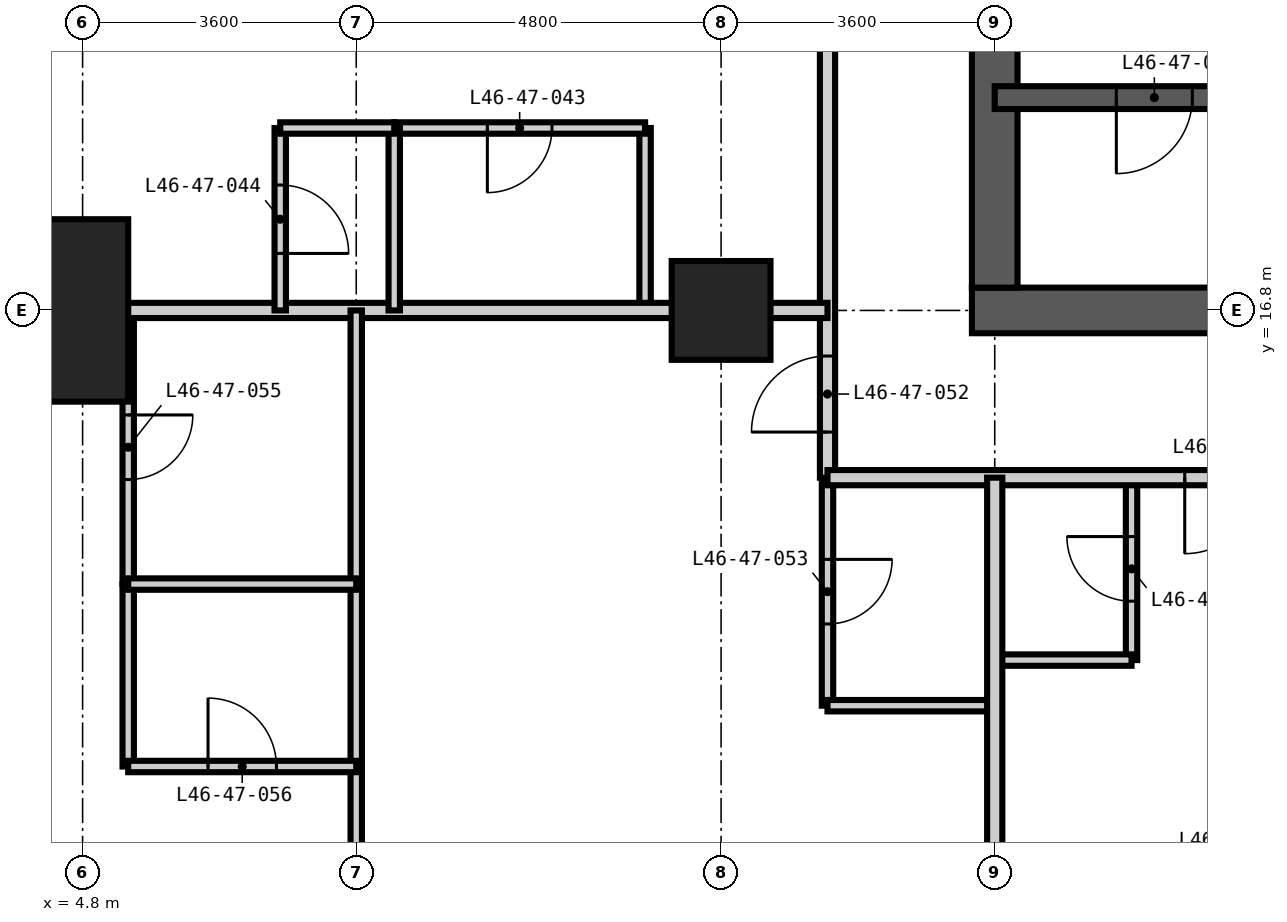
"""IFC4 building model, lengths in metres.
Left out: names, types, materials, properties, quantities, classifications, styles, units other than length and angle.
Written with IfcOpenShell. Run it as: python <this file> out.ifc"""

import sys

from ifc_helpers import new_model, si_unit, direction, frame, frame_2d, origin, origin_2d, place, context, subcontext, project, spatial, rectangle, extrude, element, fill, save


model = new_model("IFC4")
c1 = context("Model", 3, precision=1e-05, world=origin(), true_north=direction((0.0, 1.0)))
c2 = subcontext(c1, "Body", "Model", "MODEL_VIEW")
j1 = project(units=[si_unit("LENGTHUNIT", "METRE"), si_unit("PLANEANGLEUNIT", "RADIAN")], contexts=[c1])
p1 = place(None, origin())
s1 = spatial("IfcSite", under=j1, at=p1, CompositionType="ELEMENT")
p2 = place(p1, origin())
s2 = spatial("IfcBuilding", under=s1, at=p2, CompositionType="ELEMENT")
p3 = place(p2, frame((0.0, 0.0, 180.6)))
s3 = spatial("IfcBuildingStorey", under=s2, at=p3, CompositionType="ELEMENT", Elevation=180.6)
p4 = place(p3, frame((4.8, 16.8, -0.35), z_axis=(0.0, 0.0, 1.0), x_axis=(1.0, 0.0, 0.0)))
e1 = element("IfcColumn", 1, at=p4, inside=s3, PredefinedType="COLUMN", context=c2, shape_type="SweptSolid", body=[
    extrude(rectangle(XDim=1.2, YDim=2.4, at=origin_2d()), origin(), (0.0, 0.0, 1.0), 3.6),
])
p5 = place(p3, frame((13.2, 16.8, -0.35), z_axis=(0.0, 0.0, 1.0), x_axis=(1.0, 0.0, 0.0)))
e2 = element("IfcColumn", 2, at=p5, inside=s3, PredefinedType="COLUMN", context=c2, shape_type="SweptSolid", body=[
    extrude(rectangle(XDim=1.3, YDim=1.3, at=origin_2d()), origin(), (0.0, 0.0, 1.0), 3.6),
])
p6 = place(p3, frame((16.5, 16.8, -0.35), z_axis=(0.0, 0.0, 1.0), x_axis=(1.0, 0.0, 0.0)))
e3 = element("IfcWall", 3, at=p6, inside=s3, PredefinedType="SHEAR", context=c2, shape_type="SweptSolid", body=[
    extrude(rectangle(XDim=25.8, YDim=0.6, at=frame_2d((12.9, 0.0))), origin(), (0.0, 0.0, 1.0), 3.6),
])
p7 = place(p6, frame((12.4, 0.0, 0.35)))
e4 = element("IfcOpeningElement", 4, at=p7, cuts=e3, PredefinedType="OPENING", context=c2, shape_type="SweptSolid", body=[
    extrude(rectangle(XDim=1.0, YDim=2.1, at=frame_2d((0.5, 1.05))), frame((0.0, 0.31, 0.0), z_axis=(0.0, -1.0, 0.0), x_axis=(1.0, 0.0, 0.0)), (0.0, 0.0, 1.0), 0.62),
])
p8 = place(p6, frame((18.7, 0.0, 0.35)))
e5 = element("IfcOpeningElement", 5, at=p8, cuts=e3, PredefinedType="OPENING", context=c2, shape_type="SweptSolid", body=[
    extrude(rectangle(XDim=1.0, YDim=2.1, at=frame_2d((0.5, 1.05))), frame((0.0, 0.31, 0.0), z_axis=(0.0, -1.0, 0.0), x_axis=(1.0, 0.0, 0.0)), (0.0, 0.0, 1.0), 0.62),
])
p9 = place(p3, frame((16.8, 41.7, -0.35), z_axis=(0.0, 0.0, 1.0), x_axis=(0.0, -1.0, 0.0)))
e6 = element("IfcWall", 6, at=p9, inside=s3, PredefinedType="SHEAR", context=c2, shape_type="SweptSolid", body=[
    extrude(rectangle(XDim=24.6, YDim=0.6, at=frame_2d((12.3, 0.0))), origin(), (0.0, 0.0, 1.0), 3.6),
])
p10 = place(p9, frame((11.4, 0.0, 0.35)))
e7 = element("IfcOpeningElement", 7, at=p10, cuts=e6, PredefinedType="OPENING", context=c2, shape_type="SweptSolid", body=[
    extrude(rectangle(XDim=1.8, YDim=2.2, at=frame_2d((0.9, 1.1))), frame((0.0, 0.31, 0.0), z_axis=(0.0, -1.0, 0.0), x_axis=(1.0, 0.0, 0.0)), (0.0, 0.0, 1.0), 0.62),
])
p11 = place(p9, frame((20.2, 0.0, 0.35)))
e8 = element("IfcOpeningElement", 8, at=p11, cuts=e6, PredefinedType="OPENING", context=c2, shape_type="SweptSolid", body=[
    extrude(rectangle(XDim=1.0, YDim=2.1, at=frame_2d((0.5, 1.05))), frame((0.0, 0.31, 0.0), z_axis=(0.0, -1.0, 0.0), x_axis=(1.0, 0.0, 0.0)), (0.0, 0.0, 1.0), 0.62),
])
p12 = place(p9, frame((5.5, 0.0, 0.35)))
e9 = element("IfcOpeningElement", 9, at=p12, cuts=e6, PredefinedType="OPENING", context=c2, shape_type="SweptSolid", body=[
    extrude(rectangle(XDim=1.0, YDim=2.1, at=frame_2d((0.5, 1.05))), frame((0.0, 0.31, 0.0), z_axis=(0.0, -1.0, 0.0), x_axis=(1.0, 0.0, 0.0)), (0.0, 0.0, 1.0), 0.62),
])
p13 = place(p3, frame((16.8, 19.6, -0.35), z_axis=(0.0, 0.0, 1.0), x_axis=(1.0, 0.0, 0.0)))
e10 = element("IfcWall", 10, at=p13, inside=s3, PredefinedType="SHEAR", context=c2, shape_type="SweptSolid", body=[
    extrude(rectangle(XDim=8.4, YDim=0.3, at=frame_2d((4.2, 0.0))), origin(), (0.0, 0.0, 1.0), 3.6),
])
p14 = place(p13, frame((1.6, 0.0, 0.35)))
e11 = element("IfcOpeningElement", 11, at=p14, cuts=e10, PredefinedType="OPENING", context=c2, shape_type="SweptSolid", body=[
    extrude(rectangle(XDim=1.0, YDim=2.1, at=frame_2d((0.5, 1.05))), frame((0.0, 0.16, 0.0), z_axis=(0.0, -1.0, 0.0), x_axis=(1.0, 0.0, 0.0)), (0.0, 0.0, 1.0), 0.32),
])
p15 = place(p13, frame((5.8, 0.0, 0.35)))
e12 = element("IfcOpeningElement", 12, at=p15, cuts=e10, PredefinedType="OPENING", context=c2, shape_type="SweptSolid", body=[
    extrude(rectangle(XDim=1.0, YDim=2.1, at=frame_2d((0.5, 1.05))), frame((0.0, 0.16, 0.0), z_axis=(0.0, -1.0, 0.0), x_axis=(1.0, 0.0, 0.0)), (0.0, 0.0, 1.0), 0.32),
])
p16 = place(p3, frame((5.4, 13.2, 0.0), z_axis=(0.0, 0.0, 1.0), x_axis=(0.0, 1.0, 0.0)))
e13 = element("IfcWall", 13, at=p16, inside=s3, PredefinedType="PARTITIONING", context=c2, shape_type="SweptSolid", body=[
    extrude(rectangle(XDim=3.6, YDim=0.15, at=frame_2d((1.8, 0.0))), origin(), (0.0, 0.0, 1.0), 3.25),
])
p17 = place(p16, frame((1.375, 0.0, 0.0)))
e14 = element("IfcOpeningElement", 14, at=p17, cuts=e13, PredefinedType="OPENING", context=c2, shape_type="SweptSolid", body=[
    extrude(rectangle(XDim=0.85, YDim=2.1, at=frame_2d((0.425, 1.05))), frame((0.0, 0.085, 0.0), z_axis=(0.0, -1.0, 0.0), x_axis=(1.0, 0.0, 0.0)), (0.0, 0.0, 1.0), 0.17),
])
p18 = place(p3, frame((12.2, 16.8, 0.0), z_axis=(0.0, 0.0, 1.0), x_axis=(0.0, 1.0, 0.0)))
e15 = element("IfcWall", 15, at=p18, inside=s3, PredefinedType="PARTITIONING", context=c2, shape_type="SweptSolid", body=[
    extrude(rectangle(XDim=2.4, YDim=0.15, at=frame_2d((1.2, 0.0))), origin(), (0.0, 0.0, 1.0), 3.25),
])
p19 = place(p3, frame((14.6, 11.6, 0.0), z_axis=(0.0, 0.0, 1.0), x_axis=(0.0, 1.0, 0.0)))
e16 = element("IfcWall", 16, at=p19, inside=s3, PredefinedType="PARTITIONING", context=c2, shape_type="SweptSolid", body=[
    extrude(rectangle(XDim=3.0, YDim=0.15, at=frame_2d((1.5, 0.0))), origin(), (0.0, 0.0, 1.0), 3.25),
])
p20 = place(p19, frame((1.075, 0.0, 0.0)))
e17 = element("IfcOpeningElement", 17, at=p20, cuts=e16, PredefinedType="OPENING", context=c2, shape_type="SweptSolid", body=[
    extrude(rectangle(XDim=0.85, YDim=2.1, at=frame_2d((0.425, 1.05))), frame((0.0, 0.085, 0.0), z_axis=(0.0, -1.0, 0.0), x_axis=(1.0, 0.0, 0.0)), (0.0, 0.0, 1.0), 0.17),
])
p21 = place(p3, frame((18.6, 12.2, 0.0), z_axis=(0.0, 0.0, 1.0), x_axis=(0.0, 1.0, 0.0)))
e18 = element("IfcWall", 18, at=p21, inside=s3, PredefinedType="PARTITIONING", context=c2, shape_type="SweptSolid", body=[
    extrude(rectangle(XDim=2.4, YDim=0.15, at=frame_2d((1.2, 0.0))), origin(), (0.0, 0.0, 1.0), 3.25),
])
p22 = place(p21, frame((0.775, 0.0, 0.0)))
e19 = element("IfcOpeningElement", 19, at=p22, cuts=e18, PredefinedType="OPENING", context=c2, shape_type="SweptSolid", body=[
    extrude(rectangle(XDim=0.85, YDim=2.1, at=frame_2d((0.425, 1.05))), frame((0.0, 0.085, 0.0), z_axis=(0.0, -1.0, 0.0), x_axis=(1.0, 0.0, 0.0)), (0.0, 0.0, 1.0), 0.17),
])
p23 = place(p3, frame((14.6, 11.6, 0.0), z_axis=(0.0, 0.0, 1.0), x_axis=(1.0, 0.0, 0.0)))
e20 = element("IfcWall", 20, at=p23, inside=s3, PredefinedType="PARTITIONING", context=c2, shape_type="SweptSolid", body=[
    extrude(rectangle(XDim=2.2, YDim=0.15, at=frame_2d((1.1, 0.0))), origin(), (0.0, 0.0, 1.0), 3.25),
])
p24 = place(p3, frame((16.8, 12.2, 0.0), z_axis=(0.0, 0.0, 1.0), x_axis=(1.0, 0.0, 0.0)))
e21 = element("IfcWall", 21, at=p24, inside=s3, PredefinedType="PARTITIONING", context=c2, shape_type="SweptSolid", body=[
    extrude(rectangle(XDim=1.8, YDim=0.15, at=frame_2d((0.9, 0.0))), origin(), (0.0, 0.0, 1.0), 3.25),
])
p25 = place(p3, frame((8.9, 19.2, 0.0), z_axis=(0.0, 0.0, 1.0), x_axis=(1.0, 0.0, 0.0)))
e22 = element("IfcWall", 22, at=p25, inside=s3, PredefinedType="PARTITIONING", context=c2, shape_type="SweptSolid", body=[
    extrude(rectangle(XDim=3.3, YDim=0.15, at=frame_2d((1.65, 0.0))), origin(), (0.0, 0.0, 1.0), 3.25),
])
p26 = place(p25, frame((1.225, 0.0, 0.0)))
e23 = element("IfcOpeningElement", 23, at=p26, cuts=e22, PredefinedType="OPENING", context=c2, shape_type="SweptSolid", body=[
    extrude(rectangle(XDim=0.85, YDim=2.1, at=frame_2d((0.425, 1.05))), frame((0.0, 0.085, 0.0), z_axis=(0.0, -1.0, 0.0), x_axis=(1.0, 0.0, 0.0)), (0.0, 0.0, 1.0), 0.17),
])
p27 = place(p3, frame((14.6, 14.6, 0.0), z_axis=(0.0, 0.0, 1.0), x_axis=(0.0, 1.0, 0.0)))
e24 = element("IfcWall", 24, at=p27, inside=s3, PredefinedType="PARTITIONING", context=c2, shape_type="SweptSolid", body=[
    extrude(rectangle(XDim=30.8, YDim=0.2, at=frame_2d((15.4, 0.0))), origin(), (0.0, 0.0, 1.0), 3.25),
])
p28 = place(p27, frame((5.9, 0.0, 0.0)))
e25 = element("IfcOpeningElement", 25, at=p28, cuts=e24, PredefinedType="OPENING", context=c2, shape_type="SweptSolid", body=[
    extrude(rectangle(XDim=1.0, YDim=2.2, at=frame_2d((0.5, 1.1))), frame((0.0, 0.11, 0.0), z_axis=(0.0, -1.0, 0.0), x_axis=(1.0, 0.0, 0.0)), (0.0, 0.0, 1.0), 0.22),
])
p29 = place(p27, frame((11.8, 0.0, 0.0)))
e26 = element("IfcOpeningElement", 26, at=p29, cuts=e24, PredefinedType="OPENING", context=c2, shape_type="SweptSolid", body=[
    extrude(rectangle(XDim=1.8, YDim=2.4, at=frame_2d((0.9, 1.2))), frame((0.0, 0.11, 0.0), z_axis=(0.0, -1.0, 0.0), x_axis=(1.0, 0.0, 0.0)), (0.0, 0.0, 1.0), 0.22),
])
p30 = place(p27, frame((19.425, 0.0, 0.0)))
e27 = element("IfcOpeningElement", 27, at=p30, cuts=e24, PredefinedType="OPENING", context=c2, shape_type="SweptSolid", body=[
    extrude(rectangle(XDim=1.0, YDim=2.2, at=frame_2d((0.5, 1.1))), frame((0.0, 0.11, 0.0), z_axis=(0.0, -1.0, 0.0), x_axis=(1.0, 0.0, 0.0)), (0.0, 0.0, 1.0), 0.22),
])
p31 = place(p27, frame((24.8, 0.0, 0.0)))
e28 = element("IfcOpeningElement", 28, at=p31, cuts=e24, PredefinedType="OPENING", context=c2, shape_type="SweptSolid", body=[
    extrude(rectangle(XDim=1.0, YDim=2.2, at=frame_2d((0.5, 1.1))), frame((0.0, 0.11, 0.0), z_axis=(0.0, -1.0, 0.0), x_axis=(1.0, 0.0, 0.0)), (0.0, 0.0, 1.0), 0.22),
])
p32 = place(p27, frame((0.6, 0.0, 0.0)))
e29 = element("IfcOpeningElement", 29, at=p32, cuts=e24, PredefinedType="OPENING", context=c2, shape_type="SweptSolid", body=[
    extrude(rectangle(XDim=1.0, YDim=2.2, at=frame_2d((0.5, 1.1))), frame((0.0, 0.11, 0.0), z_axis=(0.0, -1.0, 0.0), x_axis=(1.0, 0.0, 0.0)), (0.0, 0.0, 1.0), 0.22),
])
p33 = place(p27, frame((28.6, 0.0, 0.0)))
e30 = element("IfcOpeningElement", 30, at=p33, cuts=e24, PredefinedType="OPENING", context=c2, shape_type="SweptSolid", body=[
    extrude(rectangle(XDim=1.0, YDim=2.2, at=frame_2d((0.5, 1.1))), frame((0.0, 0.11, 0.0), z_axis=(0.0, -1.0, 0.0), x_axis=(1.0, 0.0, 0.0)), (0.0, 0.0, 1.0), 0.22),
])
p34 = place(p3, frame((44.8, 14.6, 0.0), z_axis=(0.0, 0.0, 1.0), x_axis=(-1.0, 0.0, 0.0)))
e31 = element("IfcWall", 31, at=p34, inside=s3, PredefinedType="PARTITIONING", context=c2, shape_type="SweptSolid", body=[
    extrude(rectangle(XDim=30.2, YDim=0.2, at=frame_2d((15.1, 0.0))), origin(), (0.0, 0.0, 1.0), 3.25),
])
p35 = place(p34, frame((24.5, 0.0, 0.0)))
e32 = element("IfcOpeningElement", 32, at=p35, cuts=e31, PredefinedType="OPENING", context=c2, shape_type="SweptSolid", body=[
    extrude(rectangle(XDim=1.0, YDim=2.2, at=frame_2d((0.5, 1.1))), frame((0.0, 0.11, 0.0), z_axis=(0.0, -1.0, 0.0), x_axis=(1.0, 0.0, 0.0)), (0.0, 0.0, 1.0), 0.22),
])
p36 = place(p34, frame((13.7, 0.0, 0.0)))
e33 = element("IfcOpeningElement", 33, at=p36, cuts=e31, PredefinedType="OPENING", context=c2, shape_type="SweptSolid", body=[
    extrude(rectangle(XDim=1.0, YDim=2.2, at=frame_2d((0.5, 1.1))), frame((0.0, 0.11, 0.0), z_axis=(0.0, -1.0, 0.0), x_axis=(1.0, 0.0, 0.0)), (0.0, 0.0, 1.0), 0.22),
])
p37 = place(p34, frame((7.7, 0.0, 0.0)))
e34 = element("IfcOpeningElement", 34, at=p37, cuts=e31, PredefinedType="OPENING", context=c2, shape_type="SweptSolid", body=[
    extrude(rectangle(XDim=1.0, YDim=2.2, at=frame_2d((0.5, 1.1))), frame((0.0, 0.11, 0.0), z_axis=(0.0, -1.0, 0.0), x_axis=(1.0, 0.0, 0.0)), (0.0, 0.0, 1.0), 0.22),
])
for number, where, z_axis, x_axis in (
    (35, (16.8, 4.182, 0.0), (0.0, 0.0, 1.0), (0.0, 1.0, 0.0)),
    (36, (4.182, 16.8, 0.0), (0.0, 0.0, 1.0), (1.0, 0.0, 0.0)),
):
    element("IfcWall", number, at=place(p3, frame(where, z_axis=z_axis, x_axis=x_axis)), inside=s3, PredefinedType="PARTITIONING", context=c2, shape_type="SweptSolid", body=[
        extrude(rectangle(XDim=10.418, YDim=0.2, at=frame_2d((5.209, 0.0))), origin(), (0.0, 0.0, 1.0), 3.25),
    ])
p38 = place(p3, frame((5.4, 10.8, 0.0), z_axis=(0.0, 0.0, 1.0), x_axis=(0.0, 1.0, 0.0)))
e37 = element("IfcWall", 37, at=p38, inside=s3, PredefinedType="PARTITIONING", context=c2, shape_type="SweptSolid", body=[
    extrude(rectangle(XDim=2.4, YDim=0.15, at=frame_2d((1.2, 0.0))), origin(), (0.0, 0.0, 1.0), 3.25),
])
p39 = place(p3, frame((7.4, 16.8, 0.0), z_axis=(0.0, 0.0, 1.0), x_axis=(0.0, 1.0, 0.0)))
e38 = element("IfcWall", 38, at=p39, inside=s3, PredefinedType="PARTITIONING", context=c2, shape_type="SweptSolid", body=[
    extrude(rectangle(XDim=2.4, YDim=0.15, at=frame_2d((1.2, 0.0))), origin(), (0.0, 0.0, 1.0), 3.25),
])
p40 = place(p39, frame((0.75, 0.0, 0.0)))
e39 = element("IfcOpeningElement", 39, at=p40, cuts=e38, PredefinedType="OPENING", context=c2, shape_type="SweptSolid", body=[
    extrude(rectangle(XDim=0.9, YDim=2.1, at=frame_2d((0.45, 1.05))), frame((0.0, 0.085, 0.0), z_axis=(0.0, -1.0, 0.0), x_axis=(1.0, 0.0, 0.0)), (0.0, 0.0, 1.0), 0.17),
])
p41 = place(p3, frame((8.4, 4.182, 0.0), z_axis=(0.0, 0.0, 1.0), x_axis=(0.0, 1.0, 0.0)))
e40 = element("IfcWall", 40, at=p41, inside=s3, PredefinedType="PARTITIONING", context=c2, shape_type="SweptSolid", body=[
    extrude(rectangle(XDim=12.618, YDim=0.15, at=frame_2d((6.309, 0.0))), origin(), (0.0, 0.0, 1.0), 3.25),
])
p42 = place(p41, frame((2.868, 0.0, 0.0)))
e41 = element("IfcOpeningElement", 41, at=p42, cuts=e40, PredefinedType="OPENING", context=c2, shape_type="SweptSolid", body=[
    extrude(rectangle(XDim=0.9, YDim=2.1, at=frame_2d((0.45, 1.05))), frame((0.0, 0.085, 0.0), z_axis=(0.0, -1.0, 0.0), x_axis=(1.0, 0.0, 0.0)), (0.0, 0.0, 1.0), 0.17),
])
p43 = place(p3, frame((8.9, 16.8, 0.0), z_axis=(0.0, 0.0, 1.0), x_axis=(0.0, 1.0, 0.0)))
e42 = element("IfcWall", 42, at=p43, inside=s3, PredefinedType="PARTITIONING", context=c2, shape_type="SweptSolid", body=[
    extrude(rectangle(XDim=2.4, YDim=0.15, at=frame_2d((1.2, 0.0))), origin(), (0.0, 0.0, 1.0), 3.25),
])
p44 = place(p3, frame((5.4, 10.8, 0.0), z_axis=(0.0, 0.0, 1.0), x_axis=(1.0, 0.0, 0.0)))
e43 = element("IfcWall", 43, at=p44, inside=s3, PredefinedType="PARTITIONING", context=c2, shape_type="SweptSolid", body=[
    extrude(rectangle(XDim=3.0, YDim=0.15, at=frame_2d((1.5, 0.0))), origin(), (0.0, 0.0, 1.0), 3.25),
])
p45 = place(p44, frame((1.05, 0.0, 0.0)))
e44 = element("IfcOpeningElement", 44, at=p45, cuts=e43, PredefinedType="OPENING", context=c2, shape_type="SweptSolid", body=[
    extrude(rectangle(XDim=0.9, YDim=2.1, at=frame_2d((0.45, 1.05))), frame((0.0, 0.085, 0.0), z_axis=(0.0, -1.0, 0.0), x_axis=(1.0, 0.0, 0.0)), (0.0, 0.0, 1.0), 0.17),
])
p46 = place(p3, frame((5.4, 13.2, 0.0), z_axis=(0.0, 0.0, 1.0), x_axis=(1.0, 0.0, 0.0)))
e45 = element("IfcWall", 45, at=p46, inside=s3, PredefinedType="PARTITIONING", context=c2, shape_type="SweptSolid", body=[
    extrude(rectangle(XDim=3.0, YDim=0.15, at=frame_2d((1.5, 0.0))), origin(), (0.0, 0.0, 1.0), 3.25),
])
p47 = place(p3, frame((7.4, 19.2, 0.0), z_axis=(0.0, 0.0, 1.0), x_axis=(1.0, 0.0, 0.0)))
e46 = element("IfcWall", 46, at=p47, inside=s3, PredefinedType="PARTITIONING", context=c2, shape_type="SweptSolid", body=[
    extrude(rectangle(XDim=1.5, YDim=0.15, at=frame_2d((0.75, 0.0))), origin(), (0.0, 0.0, 1.0), 3.25),
])
p48 = place(p35, origin())
e47 = element("IfcDoor", 47, at=p48, inside=s3, OperationType="SINGLE_SWING_RIGHT", PredefinedType="DOOR", context=c2, shape_type="SweptSolid", body=[
    extrude(rectangle(XDim=1.0, YDim=2.2, at=frame_2d((0.5, 1.1))), frame((0.0, 0.025, 0.0), z_axis=(0.0, -1.0, 0.0), x_axis=(1.0, 0.0, 0.0)), (0.0, 0.0, 1.0), 0.05),
])
fill(e32, e47)
p49 = place(p22, origin())
e48 = element("IfcDoor", 48, at=p49, inside=s3, OperationType="SINGLE_SWING_RIGHT", PredefinedType="DOOR", context=c2, shape_type="SweptSolid", body=[
    extrude(rectangle(XDim=0.85, YDim=2.1, at=frame_2d((0.425, 1.05))), frame((0.0, 0.025, 0.0), z_axis=(0.0, -1.0, 0.0), x_axis=(1.0, 0.0, 0.0)), (0.0, 0.0, 1.0), 0.05),
])
fill(e19, e48)
p50 = place(p26, frame((0.85, 0.0, 0.0), z_axis=(0.0, 0.0, 1.0), x_axis=(-1.0, 0.0, 0.0)))
e49 = element("IfcDoor", 49, at=p50, inside=s3, OperationType="SINGLE_SWING_RIGHT", PredefinedType="DOOR", context=c2, shape_type="SweptSolid", body=[
    extrude(rectangle(XDim=0.85, YDim=2.1, at=frame_2d((0.425, 1.05))), frame((0.0, 0.025, 0.0), z_axis=(0.0, -1.0, 0.0), x_axis=(1.0, 0.0, 0.0)), (0.0, 0.0, 1.0), 0.05),
])
fill(e23, e49)
p51 = place(p40, frame((0.9, 0.0, 0.0), z_axis=(0.0, 0.0, 1.0), x_axis=(-1.0, 0.0, 0.0)))
e50 = element("IfcDoor", 50, at=p51, inside=s3, OperationType="SINGLE_SWING_RIGHT", PredefinedType="DOOR", context=c2, shape_type="SweptSolid", body=[
    extrude(rectangle(XDim=0.9, YDim=2.1, at=frame_2d((0.45, 1.05))), frame((0.0, 0.025, 0.0), z_axis=(0.0, -1.0, 0.0), x_axis=(1.0, 0.0, 0.0)), (0.0, 0.0, 1.0), 0.05),
])
fill(e39, e50)
p52 = place(p32, origin())
e51 = element("IfcDoor", 51, at=p52, inside=s3, OperationType="SINGLE_SWING_LEFT", PredefinedType="DOOR", context=c2, shape_type="SweptSolid", body=[
    extrude(rectangle(XDim=1.0, YDim=2.2, at=frame_2d((0.5, 1.1))), frame((0.0, 0.025, 0.0), z_axis=(0.0, -1.0, 0.0), x_axis=(1.0, 0.0, 0.0)), (0.0, 0.0, 1.0), 0.05),
])
fill(e29, e51)
p53 = place(p20, frame((0.85, 0.0, 0.0), z_axis=(0.0, 0.0, 1.0), x_axis=(-1.0, 0.0, 0.0)))
e52 = element("IfcDoor", 52, at=p53, inside=s3, OperationType="SINGLE_SWING_LEFT", PredefinedType="DOOR", context=c2, shape_type="SweptSolid", body=[
    extrude(rectangle(XDim=0.85, YDim=2.1, at=frame_2d((0.425, 1.05))), frame((0.0, 0.025, 0.0), z_axis=(0.0, -1.0, 0.0), x_axis=(1.0, 0.0, 0.0)), (0.0, 0.0, 1.0), 0.05),
])
fill(e17, e52)
p54 = place(p17, frame((0.85, 0.0, 0.0), z_axis=(0.0, 0.0, 1.0), x_axis=(-1.0, 0.0, 0.0)))
e53 = element("IfcDoor", 53, at=p54, inside=s3, OperationType="SINGLE_SWING_LEFT", PredefinedType="DOOR", context=c2, shape_type="SweptSolid", body=[
    extrude(rectangle(XDim=0.85, YDim=2.1, at=frame_2d((0.425, 1.05))), frame((0.0, 0.025, 0.0), z_axis=(0.0, -1.0, 0.0), x_axis=(1.0, 0.0, 0.0)), (0.0, 0.0, 1.0), 0.05),
])
fill(e14, e53)
p55 = place(p45, origin())
e54 = element("IfcDoor", 54, at=p55, inside=s3, OperationType="SINGLE_SWING_LEFT", PredefinedType="DOOR", context=c2, shape_type="SweptSolid", body=[
    extrude(rectangle(XDim=0.9, YDim=2.1, at=frame_2d((0.45, 1.05))), frame((0.0, 0.025, 0.0), z_axis=(0.0, -1.0, 0.0), x_axis=(1.0, 0.0, 0.0)), (0.0, 0.0, 1.0), 0.05),
])
fill(e44, e54)
p56 = place(p14, frame((1.0, 0.0, 0.0), z_axis=(0.0, 0.0, 1.0), x_axis=(-1.0, 0.0, 0.0)))
e55 = element("IfcDoor", 55, at=p56, inside=s3, OperationType="SINGLE_SWING_RIGHT", PredefinedType="DOOR", context=c2, shape_type="SweptSolid", body=[
    extrude(rectangle(XDim=1.0, YDim=2.1, at=frame_2d((0.5, 1.05))), frame((0.0, 0.025, 0.0), z_axis=(0.0, -1.0, 0.0), x_axis=(1.0, 0.0, 0.0)), (0.0, 0.0, 1.0), 0.05),
])
fill(e11, e55)
save(model, sys.argv[1])
